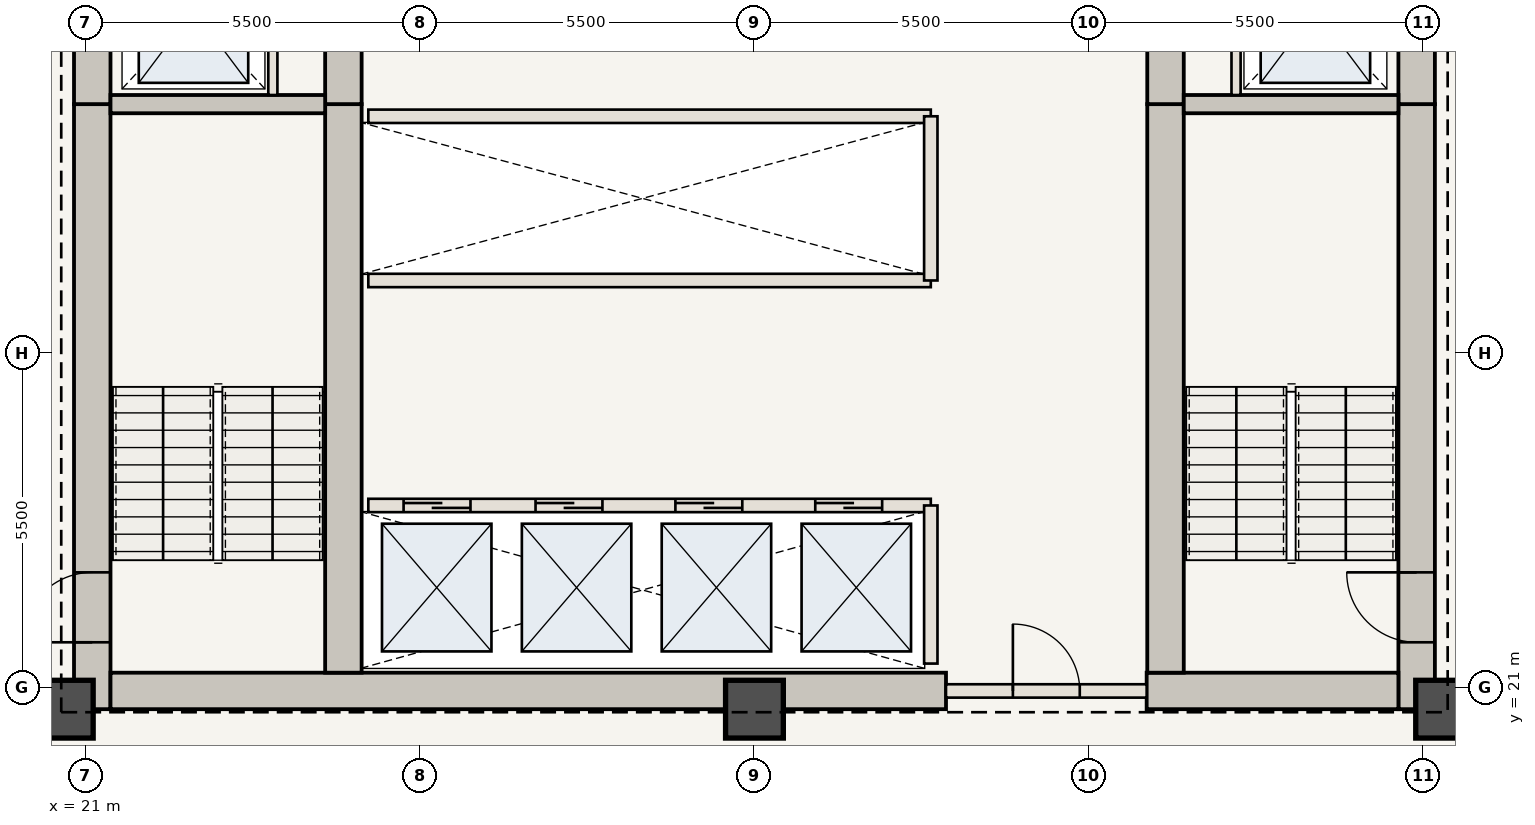
"""IFC4 building model, lengths in metres.
Left out: names, types, materials, properties, quantities, classifications, styles, units other than length and angle.
Written with IfcOpenShell. Run it as: python <this file> out.ifc"""

import sys

from ifc_helpers import new_model, si_unit, direction, frame, frame_2d, origin, origin_2d, place, context, subcontext, project, spatial, rectangle, extrude, element, fill, save


model = new_model("IFC4")
c1 = context("Model", 3, precision=1e-05, world=origin(), true_north=direction((0.0, 1.0)))
c2 = subcontext(c1, "Body", "Model", "MODEL_VIEW")
j1 = project(units=[si_unit("LENGTHUNIT", "METRE"), si_unit("PLANEANGLEUNIT", "RADIAN")], contexts=[c1])
p1 = place(None, origin())
s1 = spatial("IfcSite", under=j1, at=p1, CompositionType="ELEMENT")
p2 = place(p1, origin())
s2 = spatial("IfcBuilding", under=s1, at=p2, CompositionType="ELEMENT")
p3 = place(p2, frame((0.0, 0.0, 141.4)))
s3 = spatial("IfcBuildingStorey", under=s2, at=p3, CompositionType="ELEMENT", Elevation=141.4)
p4 = place(p3, frame((21.11, 20.65, 0.0), z_axis=(0.0, 0.0, 1.0), x_axis=(0.0, 1.0, 0.0)))
e1 = element("IfcWall", 1, at=p4, inside=s3, PredefinedType="SHEAR", context=c2, shape_type="SweptSolid", body=[
    extrude(rectangle(XDim=9.95, YDim=0.6, at=frame_2d((4.975, 0.0))), origin(), (0.0, 0.0, 1.0), 3.85),
])
p5 = place(p4, frame((1.1, 0.0, 0.0)))
e2 = element("IfcOpeningElement", 2, at=p5, cuts=e1, PredefinedType="OPENING", context=c2, shape_type="SweptSolid", body=[
    extrude(rectangle(XDim=1.15, YDim=2.15, at=frame_2d((0.575, 1.075))), frame((0.0, 0.31, 0.0), z_axis=(0.0, -1.0, 0.0), x_axis=(1.0, 0.0, 0.0)), (0.0, 0.0, 1.0), 0.62),
])
p6 = place(p3, frame((21.11, 30.6, 0.0), z_axis=(0.0, 0.0, 1.0), x_axis=(0.0, 1.0, 0.0)))
e3 = element("IfcWall", 3, at=p6, inside=s3, PredefinedType="SHEAR", context=c2, shape_type="SweptSolid", body=[
    extrude(rectangle(XDim=12.7, YDim=0.6, at=frame_2d((6.35, 0.0))), origin(), (0.0, 0.0, 1.0), 3.85),
])
p7 = place(p6, frame((4.2, 0.0, 0.0)))
e4 = element("IfcOpeningElement", 4, at=p7, cuts=e3, PredefinedType="OPENING", context=c2, shape_type="SweptSolid", body=[
    extrude(rectangle(XDim=1.1, YDim=2.15, at=frame_2d((0.55, 1.075))), frame((0.0, 0.31, 0.0), z_axis=(0.0, -1.0, 0.0), x_axis=(1.0, 0.0, 0.0)), (0.0, 0.0, 1.0), 0.62),
])
p8 = place(p6, frame((8.05, 0.0, 0.0)))
e5 = element("IfcOpeningElement", 5, at=p8, cuts=e3, PredefinedType="OPENING", context=c2, shape_type="SweptSolid", body=[
    extrude(rectangle(XDim=0.92, YDim=2.1, at=frame_2d((0.46, 1.05))), frame((0.0, 0.31, 0.0), z_axis=(0.0, -1.0, 0.0), x_axis=(1.0, 0.0, 0.0)), (0.0, 0.0, 1.0), 0.62),
])
p9 = place(p6, frame((9.45, 0.0, 0.0)))
e6 = element("IfcOpeningElement", 6, at=p9, cuts=e3, PredefinedType="OPENING", context=c2, shape_type="SweptSolid", body=[
    extrude(rectangle(XDim=0.88, YDim=2.1, at=frame_2d((0.44, 1.05))), frame((0.0, 0.31, 0.0), z_axis=(0.0, -1.0, 0.0), x_axis=(1.0, 0.0, 0.0)), (0.0, 0.0, 1.0), 0.62),
])
p10 = place(p6, frame((10.85, 0.0, 0.0)))
e7 = element("IfcOpeningElement", 7, at=p10, cuts=e3, PredefinedType="OPENING", context=c2, shape_type="SweptSolid", body=[
    extrude(rectangle(XDim=0.88, YDim=2.1, at=frame_2d((0.44, 1.05))), frame((0.0, 0.31, 0.0), z_axis=(0.0, -1.0, 0.0), x_axis=(1.0, 0.0, 0.0)), (0.0, 0.0, 1.0), 0.62),
])
p11 = place(p3, frame((42.89, 20.65, 0.0), z_axis=(0.0, 0.0, 1.0), x_axis=(0.0, 1.0, 0.0)))
e8 = element("IfcWall", 8, at=p11, inside=s3, PredefinedType="SHEAR", context=c2, shape_type="SweptSolid", body=[
    extrude(rectangle(XDim=9.95, YDim=0.6, at=frame_2d((4.975, 0.0))), origin(), (0.0, 0.0, 1.0), 3.85),
])
p12 = place(p11, frame((1.1, 0.0, 0.0)))
e9 = element("IfcOpeningElement", 9, at=p12, cuts=e8, PredefinedType="OPENING", context=c2, shape_type="SweptSolid", body=[
    extrude(rectangle(XDim=1.15, YDim=2.15, at=frame_2d((0.575, 1.075))), frame((0.0, 0.31, 0.0), z_axis=(0.0, -1.0, 0.0), x_axis=(1.0, 0.0, 0.0)), (0.0, 0.0, 1.0), 0.62),
])
p13 = place(p3, frame((42.89, 30.6, 0.0), z_axis=(0.0, 0.0, 1.0), x_axis=(0.0, 1.0, 0.0)))
e10 = element("IfcWall", 10, at=p13, inside=s3, PredefinedType="SHEAR", context=c2, shape_type="SweptSolid", body=[
    extrude(rectangle(XDim=12.7, YDim=0.6, at=frame_2d((6.35, 0.0))), origin(), (0.0, 0.0, 1.0), 3.85),
])
p14 = place(p13, frame((4.2, 0.0, 0.0)))
e11 = element("IfcOpeningElement", 11, at=p14, cuts=e10, PredefinedType="OPENING", context=c2, shape_type="SweptSolid", body=[
    extrude(rectangle(XDim=1.1, YDim=2.15, at=frame_2d((0.55, 1.075))), frame((0.0, 0.31, 0.0), z_axis=(0.0, -1.0, 0.0), x_axis=(1.0, 0.0, 0.0)), (0.0, 0.0, 1.0), 0.62),
])
p15 = place(p13, frame((9.2, 0.0, 0.0)))
e12 = element("IfcOpeningElement", 12, at=p15, cuts=e10, PredefinedType="OPENING", context=c2, shape_type="SweptSolid", body=[
    extrude(rectangle(XDim=0.92, YDim=2.1, at=frame_2d((0.46, 1.05))), frame((0.0, 0.31, 0.0), z_axis=(0.0, -1.0, 0.0), x_axis=(1.0, 0.0, 0.0)), (0.0, 0.0, 1.0), 0.62),
])
p16 = place(p3, frame((21.41, 20.95, 0.0), z_axis=(0.0, 0.0, 1.0), x_axis=(1.0, 0.0, 0.0)))
e13 = element("IfcWall", 13, at=p16, inside=s3, PredefinedType="SHEAR", context=c2, shape_type="SweptSolid", body=[
    extrude(rectangle(XDim=13.74, YDim=0.6, at=frame_2d((6.87, 0.0))), origin(), (0.0, 0.0, 1.0), 3.85),
])
p17 = place(p3, frame((38.45, 20.95, 0.0), z_axis=(0.0, 0.0, 1.0), x_axis=(1.0, 0.0, 0.0)))
e14 = element("IfcWall", 14, at=p17, inside=s3, PredefinedType="SHEAR", context=c2, shape_type="SweptSolid", body=[
    extrude(rectangle(XDim=4.14, YDim=0.6, at=frame_2d((2.07, 0.0))), origin(), (0.0, 0.0, 1.0), 3.85),
])
p18 = place(p3, frame((25.24, 21.25, 0.0), z_axis=(0.0, 0.0, 1.0), x_axis=(0.0, 1.0, 0.0)))
e15 = element("IfcWall", 15, at=p18, inside=s3, PredefinedType="SHEAR", context=c2, shape_type="SweptSolid", body=[
    extrude(rectangle(XDim=9.35, YDim=0.6, at=frame_2d((4.675, 0.0))), origin(), (0.0, 0.0, 1.0), 3.85),
])
p19 = place(p3, frame((25.24, 30.6, 0.0), z_axis=(0.0, 0.0, 1.0), x_axis=(0.0, 1.0, 0.0)))
e16 = element("IfcWall", 16, at=p19, inside=s3, PredefinedType="SHEAR", context=c2, shape_type="SweptSolid", body=[
    extrude(rectangle(XDim=12.1, YDim=0.6, at=frame_2d((6.05, 0.0))), origin(), (0.0, 0.0, 1.0), 3.85),
])
p20 = place(p19, frame((6.25, 0.0, 0.0)))
e17 = element("IfcOpeningElement", 17, at=p20, cuts=e16, PredefinedType="OPENING", context=c2, shape_type="SweptSolid", body=[
    extrude(rectangle(XDim=1.1, YDim=2.15, at=frame_2d((0.55, 1.075))), frame((0.0, 0.31, 0.0), z_axis=(0.0, -1.0, 0.0), x_axis=(1.0, 0.0, 0.0)), (0.0, 0.0, 1.0), 0.62),
])
p21 = place(p3, frame((38.76, 21.25, 0.0), z_axis=(0.0, 0.0, 1.0), x_axis=(0.0, 1.0, 0.0)))
e18 = element("IfcWall", 18, at=p21, inside=s3, PredefinedType="SHEAR", context=c2, shape_type="SweptSolid", body=[
    extrude(rectangle(XDim=9.35, YDim=0.6, at=frame_2d((4.675, 0.0))), origin(), (0.0, 0.0, 1.0), 3.85),
])
p22 = place(p3, frame((38.76, 30.6, 0.0), z_axis=(0.0, 0.0, 1.0), x_axis=(0.0, 1.0, 0.0)))
e19 = element("IfcWall", 19, at=p22, inside=s3, PredefinedType="SHEAR", context=c2, shape_type="SweptSolid", body=[
    extrude(rectangle(XDim=12.1, YDim=0.6, at=frame_2d((6.05, 0.0))), origin(), (0.0, 0.0, 1.0), 3.85),
])
for number, where, z_axis, x_axis in (
    (20, (20.65, 20.65, 0.0), (0.0, 0.0, 1.0), (1.0, 0.0, 0.0)),
    (21, (32.0, 20.65, 0.0), (0.0, 0.0, 1.0), (1.0, 0.0, 0.0)),
    (22, (43.35, 20.65, 0.0), (0.0, 0.0, 1.0), (1.0, 0.0, 0.0)),
):
    element("IfcColumn", number, at=place(p3, frame(where, z_axis=z_axis, x_axis=x_axis)), inside=s3, PredefinedType="COLUMN", context=c2, shape_type="SweptSolid", body=[
        extrude(rectangle(XDim=0.95, YDim=0.95, at=origin_2d()), origin(), (0.0, 0.0, 1.0), 3.85),
    ])
for number, where, z_axis, x_axis in (
    (23, (21.41, 30.6, 0.0), (0.0, 0.0, 1.0), (1.0, 0.0, 0.0)),
    (24, (39.06, 30.6, 0.0), (0.0, 0.0, 1.0), (1.0, 0.0, 0.0)),
):
    element("IfcWall", number, at=place(p3, frame(where, z_axis=z_axis, x_axis=x_axis)), inside=s3, PredefinedType="SHEAR", context=c2, shape_type="SweptSolid", body=[
        extrude(rectangle(XDim=3.53, YDim=0.3, at=frame_2d((1.765, 0.0))), origin(), (0.0, 0.0, 1.0), 3.685),
    ])
for number, where, z_axis, x_axis in (
    (25, (24.08, 30.75, 0.0), (0.0, 0.0, 1.0), (0.0, 1.0, 0.0)),
    (26, (39.92, 30.75, 0.0), (0.0, 0.0, 1.0), (0.0, 1.0, 0.0)),
):
    element("IfcWall", number, at=place(p3, frame(where, z_axis=z_axis, x_axis=x_axis)), inside=s3, PredefinedType="STANDARD", context=c2, shape_type="SweptSolid", body=[
        extrude(rectangle(XDim=2.65, YDim=0.15, at=frame_2d((1.325, 0.0))), origin(), (0.0, 0.0, 1.0), 3.685),
    ])
p23 = place(p3, frame((35.15, 20.95, 0.0), z_axis=(0.0, 0.0, 1.0), x_axis=(1.0, 0.0, 0.0)))
e27 = element("IfcWall", 27, at=p23, inside=s3, PredefinedType="STANDARD", context=c2, shape_type="SweptSolid", body=[
    extrude(rectangle(XDim=3.3, YDim=0.22, at=frame_2d((1.65, 0.0))), origin(), (0.0, 0.0, 1.0), 3.685),
])
p24 = place(p23, frame((1.1, 0.0, 0.0)))
e28 = element("IfcOpeningElement", 28, at=p24, cuts=e27, PredefinedType="OPENING", context=c2, shape_type="SweptSolid", body=[
    extrude(rectangle(XDim=1.1, YDim=2.15, at=frame_2d((0.55, 1.075))), frame((0.0, 0.12, 0.0), z_axis=(0.0, -1.0, 0.0), x_axis=(1.0, 0.0, 0.0)), (0.0, 0.0, 1.0), 0.24),
])
p25 = place(p3, frame((25.65, 24.0, 0.0), z_axis=(0.0, 0.0, 1.0), x_axis=(1.0, 0.0, 0.0)))
e29 = element("IfcWall", 29, at=p25, inside=s3, PredefinedType="STANDARD", context=c2, shape_type="SweptSolid", body=[
    extrude(rectangle(XDim=9.25, YDim=0.22, at=frame_2d((4.625, 0.0))), origin(), (0.0, 0.0, 1.0), 3.685),
])
p26 = place(p25, frame((0.58, 0.0, 0.0)))
e30 = element("IfcOpeningElement", 30, at=p26, cuts=e29, PredefinedType="OPENING", context=c2, shape_type="SweptSolid", body=[
    extrude(rectangle(XDim=1.1, YDim=2.15, at=frame_2d((0.55, 1.075))), frame((0.0, 0.12, 0.0), z_axis=(0.0, -1.0, 0.0), x_axis=(1.0, 0.0, 0.0)), (0.0, 0.0, 1.0), 0.24),
])
p27 = place(p25, frame((2.75, 0.0, 0.0)))
e31 = element("IfcOpeningElement", 31, at=p27, cuts=e29, PredefinedType="OPENING", context=c2, shape_type="SweptSolid", body=[
    extrude(rectangle(XDim=1.1, YDim=2.15, at=frame_2d((0.55, 1.075))), frame((0.0, 0.12, 0.0), z_axis=(0.0, -1.0, 0.0), x_axis=(1.0, 0.0, 0.0)), (0.0, 0.0, 1.0), 0.24),
])
p28 = place(p25, frame((5.05, 0.0, 0.0)))
e32 = element("IfcOpeningElement", 32, at=p28, cuts=e29, PredefinedType="OPENING", context=c2, shape_type="SweptSolid", body=[
    extrude(rectangle(XDim=1.1, YDim=2.15, at=frame_2d((0.55, 1.075))), frame((0.0, 0.12, 0.0), z_axis=(0.0, -1.0, 0.0), x_axis=(1.0, 0.0, 0.0)), (0.0, 0.0, 1.0), 0.24),
])
p29 = place(p25, frame((7.35, 0.0, 0.0)))
e33 = element("IfcOpeningElement", 33, at=p29, cuts=e29, PredefinedType="OPENING", context=c2, shape_type="SweptSolid", body=[
    extrude(rectangle(XDim=1.1, YDim=2.15, at=frame_2d((0.55, 1.075))), frame((0.0, 0.12, 0.0), z_axis=(0.0, -1.0, 0.0), x_axis=(1.0, 0.0, 0.0)), (0.0, 0.0, 1.0), 0.24),
])
p30 = place(p3, frame((34.9, 21.4, 0.0), z_axis=(0.0, 0.0, 1.0), x_axis=(0.0, 1.0, 0.0)))
e34 = element("IfcWall", 34, at=p30, inside=s3, PredefinedType="STANDARD", context=c2, shape_type="SweptSolid", body=[
    extrude(rectangle(XDim=2.6, YDim=0.22, at=frame_2d((1.3, 0.0))), origin(), (0.0, 0.0, 1.0), 3.685),
])
for number, where, z_axis, x_axis in (
    (35, (25.65, 27.7, 0.0), (0.0, 0.0, 1.0), (1.0, 0.0, 0.0)),
    (36, (25.65, 30.4, 0.0), (0.0, 0.0, 1.0), (1.0, 0.0, 0.0)),
):
    element("IfcWall", number, at=place(p3, frame(where, z_axis=z_axis, x_axis=x_axis)), inside=s3, PredefinedType="STANDARD", context=c2, shape_type="SweptSolid", body=[
        extrude(rectangle(XDim=9.25, YDim=0.22, at=frame_2d((4.625, 0.0))), origin(), (0.0, 0.0, 1.0), 3.685),
    ])
p31 = place(p3, frame((34.9, 27.7, 0.0), z_axis=(0.0, 0.0, 1.0), x_axis=(0.0, 1.0, 0.0)))
e37 = element("IfcWall", 37, at=p31, inside=s3, PredefinedType="STANDARD", context=c2, shape_type="SweptSolid", body=[
    extrude(rectangle(XDim=2.7, YDim=0.22, at=frame_2d((1.35, 0.0))), origin(), (0.0, 0.0, 1.0), 3.685),
])
p32 = place(p5, origin())
e38 = element("IfcDoor", 38, at=p32, inside=s3, OperationType="SINGLE_SWING_LEFT", PredefinedType="DOOR", context=c2, shape_type="SweptSolid", body=[
    extrude(rectangle(XDim=1.15, YDim=2.15, at=frame_2d((0.575, 1.075))), frame((0.0, 0.025, 0.0), z_axis=(0.0, -1.0, 0.0), x_axis=(1.0, 0.0, 0.0)), (0.0, 0.0, 1.0), 0.05),
])
fill(e2, e38)
p33 = place(p12, origin())
e39 = element("IfcDoor", 39, at=p33, inside=s3, OperationType="SINGLE_SWING_RIGHT", PredefinedType="DOOR", context=c2, shape_type="SweptSolid", body=[
    extrude(rectangle(XDim=1.15, YDim=2.15, at=frame_2d((0.575, 1.075))), frame((0.0, 0.025, 0.0), z_axis=(0.0, -1.0, 0.0), x_axis=(1.0, 0.0, 0.0)), (0.0, 0.0, 1.0), 0.05),
])
fill(e9, e39)
p34 = place(p24, origin())
e40 = element("IfcDoor", 40, at=p34, inside=s3, OperationType="SINGLE_SWING_LEFT", PredefinedType="DOOR", context=c2, shape_type="SweptSolid", body=[
    extrude(rectangle(XDim=1.1, YDim=2.15, at=frame_2d((0.55, 1.075))), frame((0.0, 0.025, 0.0), z_axis=(0.0, -1.0, 0.0), x_axis=(1.0, 0.0, 0.0)), (0.0, 0.0, 1.0), 0.05),
])
fill(e28, e40)
p35 = place(p26, origin())
e41 = element("IfcDoor", 41, at=p35, inside=s3, OperationType="DOUBLE_DOOR_SLIDING", PredefinedType="DOOR", context=c2, shape_type="SweptSolid", body=[
    extrude(rectangle(XDim=1.1, YDim=2.15, at=frame_2d((0.55, 1.075))), frame((0.0, 0.025, 0.0), z_axis=(0.0, -1.0, 0.0), x_axis=(1.0, 0.0, 0.0)), (0.0, 0.0, 1.0), 0.05),
])
fill(e30, e41)
p36 = place(p27, origin())
e42 = element("IfcDoor", 42, at=p36, inside=s3, OperationType="DOUBLE_DOOR_SLIDING", PredefinedType="DOOR", context=c2, shape_type="SweptSolid", body=[
    extrude(rectangle(XDim=1.1, YDim=2.15, at=frame_2d((0.55, 1.075))), frame((0.0, 0.025, 0.0), z_axis=(0.0, -1.0, 0.0), x_axis=(1.0, 0.0, 0.0)), (0.0, 0.0, 1.0), 0.05),
])
fill(e31, e42)
p37 = place(p28, origin())
e43 = element("IfcDoor", 43, at=p37, inside=s3, OperationType="DOUBLE_DOOR_SLIDING", PredefinedType="DOOR", context=c2, shape_type="SweptSolid", body=[
    extrude(rectangle(XDim=1.1, YDim=2.15, at=frame_2d((0.55, 1.075))), frame((0.0, 0.025, 0.0), z_axis=(0.0, -1.0, 0.0), x_axis=(1.0, 0.0, 0.0)), (0.0, 0.0, 1.0), 0.05),
])
fill(e32, e43)
p38 = place(p29, origin())
e44 = element("IfcDoor", 44, at=p38, inside=s3, OperationType="DOUBLE_DOOR_SLIDING", PredefinedType="DOOR", context=c2, shape_type="SweptSolid", body=[
    extrude(rectangle(XDim=1.1, YDim=2.15, at=frame_2d((0.55, 1.075))), frame((0.0, 0.025, 0.0), z_axis=(0.0, -1.0, 0.0), x_axis=(1.0, 0.0, 0.0)), (0.0, 0.0, 1.0), 0.05),
])
fill(e33, e44)
save(model, sys.argv[1])
